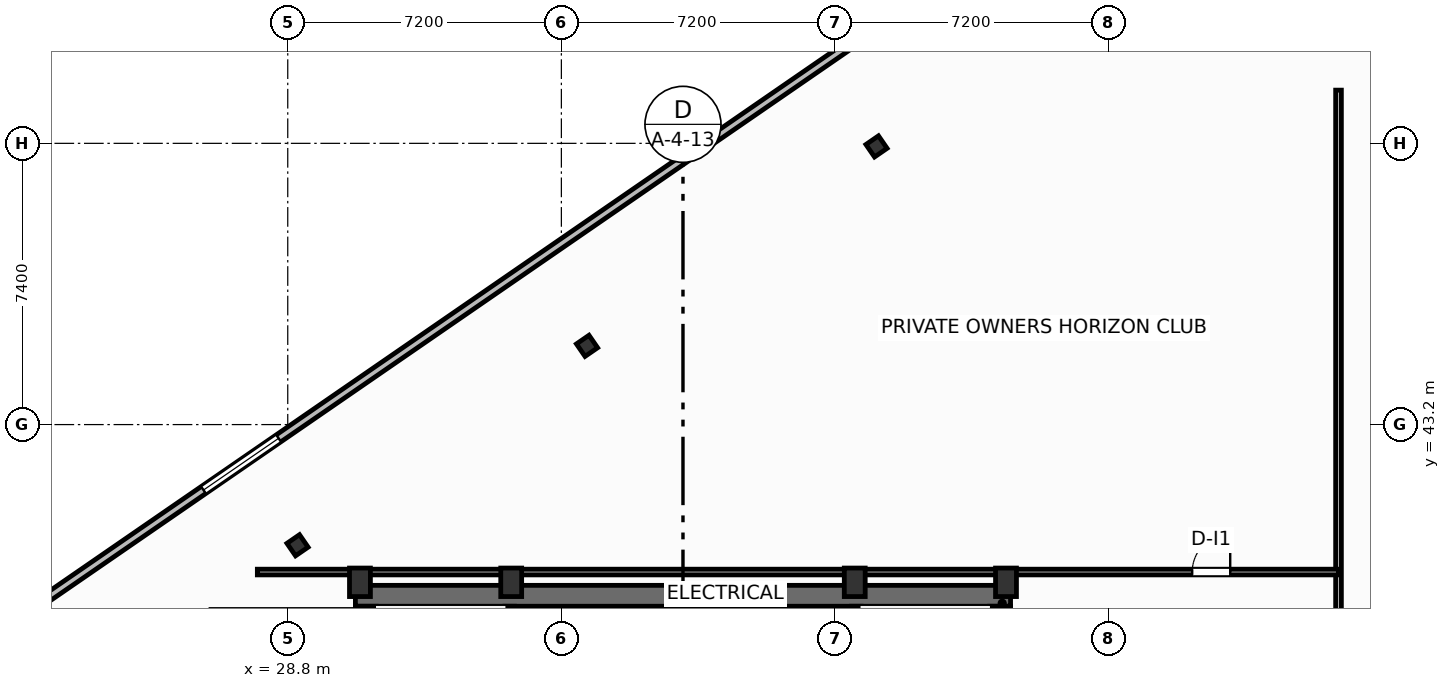
"""IFC4 building model, lengths in metres.
Left out: names, types, materials, properties, quantities, classifications, styles, units other than length and angle.
Written with IfcOpenShell. Run it as: python <this file> out.ifc"""

import sys

from ifc_helpers import new_model, si_unit, direction, frame, frame_2d, origin, origin_2d, place, context, subcontext, project, spatial, rectangle, i_section, extrude, element, fill, save


model = new_model("IFC4")
c1 = context("Model", 3, precision=1e-05, world=origin(), true_north=direction((0.0, 1.0)))
c2 = subcontext(c1, "Body", "Model", "MODEL_VIEW")
j1 = project(units=[si_unit("LENGTHUNIT", "METRE"), si_unit("PLANEANGLEUNIT", "RADIAN")], contexts=[c1])
p1 = place(None, origin())
s1 = spatial("IfcSite", under=j1, at=p1, CompositionType="ELEMENT")
p2 = place(p1, origin())
s2 = spatial("IfcBuilding", under=s1, at=p2, CompositionType="ELEMENT")
p3 = place(p2, frame((0.0, 0.0, 291.5)))
s3 = spatial("IfcBuildingStorey", under=s2, at=p3, CompositionType="ELEMENT", Elevation=291.5)
for number, where, z_axis, x_axis in (
    (1, (30.7, 39.05, 0.0), (0.0, 0.0, 1.0), (1.0, 0.0, 0.0)),
    (2, (34.68, 39.05, 0.0), (0.0, 0.0, 1.0), (1.0, 0.0, 0.0)),
    (3, (43.72, 39.05, 0.0), (0.0, 0.0, 1.0), (1.0, 0.0, 0.0)),
    (4, (47.7, 39.05, 0.0), (0.0, 0.0, 1.0), (1.0, 0.0, 0.0)),
):
    element("IfcColumn", number, at=place(p3, frame(where, z_axis=z_axis, x_axis=x_axis)), inside=s3, PredefinedType="COLUMN", context=c2, shape_type="SweptSolid", body=[
        extrude(rectangle(XDim=0.55, YDim=0.75, at=origin_2d()), origin(), (0.0, 0.0, 1.0), 4.8),
    ])
p4 = place(p3, frame((30.58, 38.695, 0.0), z_axis=(0.0, 0.0, 1.0), x_axis=(1.0, 0.0, 0.0)))
e5 = element("IfcWall", 5, at=p4, inside=s3, PredefinedType="SHEAR", context=c2, shape_type="SweptSolid", body=[
    extrude(rectangle(XDim=17.24, YDim=0.55, at=frame_2d((8.62, 0.0))), origin(), (0.0, 0.0, 1.0), 4.48),
])
for number, where, z_axis, x_axis in (
    (6, (30.855, 29.2, 0.0), (0.0, 0.0, 1.0), (0.0, 1.0, 0.0)),
    (7, (47.545, 29.2, 0.0), (0.0, 0.0, 1.0), (0.0, 1.0, 0.0)),
):
    element("IfcWall", number, at=place(p3, frame(where, z_axis=z_axis, x_axis=x_axis)), inside=s3, PredefinedType="SHEAR", context=c2, shape_type="SweptSolid", body=[
        extrude(rectangle(XDim=9.22, YDim=0.55, at=frame_2d((4.61, 0.0))), origin(), (0.0, 0.0, 1.0), 4.48),
    ])
p5 = place(p3, frame((34.64, 29.2, 0.0), z_axis=(0.0, 0.0, 1.0), x_axis=(0.0, 1.0, 0.0)))
e8 = element("IfcWall", 8, at=p5, inside=s3, PredefinedType="SHEAR", context=c2, shape_type="SweptSolid", body=[
    extrude(rectangle(XDim=9.22, YDim=0.25, at=frame_2d((4.61, 0.0))), origin(), (0.0, 0.0, 1.0), 4.48),
])
p6 = place(p5, frame((0.65, 0.0, 0.0)))
e9 = element("IfcOpeningElement", 9, at=p6, cuts=e8, PredefinedType="OPENING", context=c2, shape_type="SweptSolid", body=[
    extrude(rectangle(XDim=1.05, YDim=2.15, at=frame_2d((0.525, 1.075))), frame((0.0, 0.135, 0.0), z_axis=(0.0, -1.0, 0.0), x_axis=(1.0, 0.0, 0.0)), (0.0, 0.0, 1.0), 0.27),
])
p7 = place(p3, frame((43.76, 29.2, 0.0), z_axis=(0.0, 0.0, 1.0), x_axis=(0.0, 1.0, 0.0)))
e10 = element("IfcWall", 10, at=p7, inside=s3, PredefinedType="SHEAR", context=c2, shape_type="SweptSolid", body=[
    extrude(rectangle(XDim=9.22, YDim=0.25, at=frame_2d((4.61, 0.0))), origin(), (0.0, 0.0, 1.0), 4.48),
])
p8 = place(p7, frame((0.65, 0.0, 0.0)))
e11 = element("IfcOpeningElement", 11, at=p8, cuts=e10, PredefinedType="OPENING", context=c2, shape_type="SweptSolid", body=[
    extrude(rectangle(XDim=1.05, YDim=2.15, at=frame_2d((0.525, 1.075))), frame((0.0, 0.135, 0.0), z_axis=(0.0, -1.0, 0.0), x_axis=(1.0, 0.0, 0.0)), (0.0, 0.0, 1.0), 0.27),
])
for number, where, z_axis, x_axis in (
    (12, (44.292, 50.519, 0.0), (0.0, 0.0, 1.0), (0.824, 0.567, 0.0)),
    (13, (36.675, 45.272, 0.0), (0.0, 0.0, 1.0), (0.824, 0.567, 0.0)),
    (14, (29.057, 40.025, 0.0), (0.0, 0.0, 1.0), (0.824, 0.567, 0.0)),
):
    element("IfcColumn", number, at=place(p3, frame(where, z_axis=z_axis, x_axis=x_axis)), inside=s3, PredefinedType="COLUMN", context=c2, shape_type="SweptSolid", body=[
        extrude(i_section(OverallWidth=0.401, OverallDepth=0.399, WebThickness=0.025, FlangeThickness=0.04, FilletRadius=0.022, at=origin_2d()), origin(), (0.0, 0.0, 1.0), 4.8),
    ])
p9 = place(p3, frame((50.695, 58.086, 0.0), z_axis=(0.0, 0.0, 1.0), x_axis=(-0.823531024939, -0.567271232272, 0.0)))
e15 = element("IfcWall", 15, at=p9, inside=s3, PredefinedType="SOLIDWALL", context=c2, shape_type="SweptSolid", body=[
    extrude(rectangle(XDim=56.157, YDim=0.22, at=frame_2d((28.079, 0.0))), origin(), (0.0, 0.0, 1.0), 3.76),
])
p10 = place(p9, frame((26.879, 0.0, 0.8)))
e16 = element("IfcOpeningElement", 16, at=p10, cuts=e15, PredefinedType="OPENING", context=c2, shape_type="SweptSolid", body=[
    extrude(rectangle(XDim=2.4, YDim=1.85, at=frame_2d((1.2, 0.925))), frame((0.0, 0.12, 0.0), z_axis=(0.0, -1.0, 0.0), x_axis=(1.0, 0.0, 0.0)), (0.0, 0.0, 1.0), 0.24),
])
p11 = place(p3, frame((56.45, 19.3, 0.0), z_axis=(0.0, 0.0, 1.0), x_axis=(0.0, 1.0, 0.0)))
e17 = element("IfcWall", 17, at=p11, inside=s3, PredefinedType="PARTITIONING", context=c2, shape_type="SweptSolid", body=[
    extrude(rectangle(XDim=32.7, YDim=0.15, at=frame_2d((16.35, 0.0))), origin(), (0.0, 0.0, 1.0), 2.265),
])
p12 = place(p11, frame((7.6, 0.0, 0.0)))
e18 = element("IfcOpeningElement", 18, at=p12, cuts=e17, PredefinedType="OPENING", context=c2, shape_type="SweptSolid", body=[
    extrude(rectangle(XDim=2.0, YDim=2.05, at=frame_2d((1.0, 1.025))), frame((0.0, 0.085, 0.0), z_axis=(0.0, -1.0, 0.0), x_axis=(1.0, 0.0, 0.0)), (0.0, 0.0, 1.0), 0.17),
])
p13 = place(p3, frame((28.0, 39.32, 0.0), z_axis=(0.0, 0.0, 1.0), x_axis=(1.0, 0.0, 0.0)))
e19 = element("IfcWall", 19, at=p13, inside=s3, PredefinedType="PARTITIONING", context=c2, shape_type="SweptSolid", body=[
    extrude(rectangle(XDim=28.45, YDim=0.15, at=frame_2d((14.225, 0.0))), origin(), (0.0, 0.0, 1.0), 4.48),
])
p14 = place(p13, frame((24.6, 0.0, 0.0)))
e20 = element("IfcOpeningElement", 20, at=p14, cuts=e19, PredefinedType="OPENING", context=c2, shape_type="SweptSolid", body=[
    extrude(rectangle(XDim=1.0, YDim=2.05, at=frame_2d((0.5, 1.025))), frame((0.0, 0.085, 0.0), z_axis=(0.0, -1.0, 0.0), x_axis=(1.0, 0.0, 0.0)), (0.0, 0.0, 1.0), 0.17),
])
p15 = place(p10, origin())
e21 = element("IfcWindow", 21, at=p15, inside=s3, PartitioningType="SINGLE_PANEL", PredefinedType="WINDOW", context=c2, shape_type="SweptSolid", body=[
    extrude(rectangle(XDim=2.4, YDim=1.85, at=frame_2d((1.2, 0.925))), frame((0.0, 0.03, 0.0), z_axis=(0.0, -1.0, 0.0), x_axis=(1.0, 0.0, 0.0)), (0.0, 0.0, 1.0), 0.06),
])
fill(e16, e21)
p16 = place(p14, origin())
e22 = element("IfcDoor", 22, at=p16, inside=s3, OperationType="SINGLE_SWING_RIGHT", PredefinedType="DOOR", context=c2, shape_type="SweptSolid", body=[
    extrude(rectangle(XDim=1.0, YDim=2.05, at=frame_2d((0.5, 1.025))), frame((0.0, 0.025, 0.0), z_axis=(0.0, -1.0, 0.0), x_axis=(1.0, 0.0, 0.0)), (0.0, 0.0, 1.0), 0.05),
])
fill(e20, e22)
save(model, sys.argv[1])
